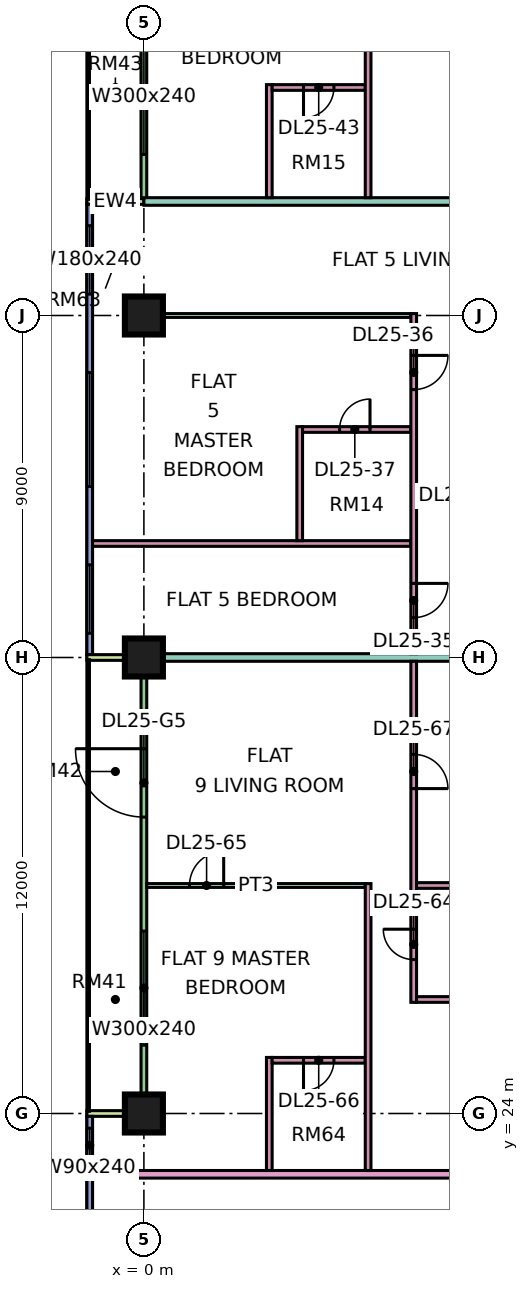
"""IFC4 building model, lengths in metres.
Left out: names, types, materials, properties, quantities, classifications, styles, units other than length and angle.
Written with IfcOpenShell. Run it as: python <this file> out.ifc"""

import sys

from ifc_helpers import new_model, si_unit, direction, frame, frame_2d, origin, origin_2d, place, context, subcontext, project, spatial, rectangle, extrude, element, fill, save


model = new_model("IFC4")
c1 = context("Model", 3, precision=1e-05, world=origin(), true_north=direction((0.0, 1.0)))
c2 = subcontext(c1, "Body", "Model", "MODEL_VIEW")
j1 = project(units=[si_unit("LENGTHUNIT", "METRE"), si_unit("PLANEANGLEUNIT", "RADIAN")], contexts=[c1])
p1 = place(None, origin())
s1 = spatial("IfcSite", under=j1, at=p1, CompositionType="ELEMENT")
p2 = place(p1, origin())
s2 = spatial("IfcBuilding", under=s1, at=p2, CompositionType="ELEMENT")
p3 = place(p2, frame((0.0, 0.0, 110.65)))
s3 = spatial("IfcBuildingStorey", under=s2, at=p3, CompositionType="ELEMENT", Elevation=110.65)
p4 = place(p3, frame((0.0, 24.0, 0.0), z_axis=(0.0, 0.0, 1.0), x_axis=(1.0, 0.0, 0.0)))
e1 = element("IfcColumn", 1, at=p4, inside=s3, PredefinedType="COLUMN", context=c2, shape_type="SweptSolid", body=[
    extrude(rectangle(XDim=1.0, YDim=1.0, at=origin_2d()), origin(), (0.0, 0.0, 1.0), 3.75),
])
p5 = place(p3, frame((0.0, 36.0, 0.0), z_axis=(0.0, 0.0, 1.0), x_axis=(1.0, 0.0, 0.0)))
e2 = element("IfcColumn", 2, at=p5, inside=s3, PredefinedType="COLUMN", context=c2, shape_type="SweptSolid", body=[
    extrude(rectangle(XDim=1.0, YDim=1.0, at=origin_2d()), origin(), (0.0, 0.0, 1.0), 3.75),
])
p6 = place(p3, frame((0.0, 45.0, 0.0), z_axis=(0.0, 0.0, 1.0), x_axis=(1.0, 0.0, 0.0)))
e3 = element("IfcColumn", 3, at=p6, inside=s3, PredefinedType="COLUMN", context=c2, shape_type="SweptSolid", body=[
    extrude(rectangle(XDim=1.0, YDim=1.0, at=origin_2d()), origin(), (0.0, 0.0, 1.0), 3.75),
])
p7 = place(p3, frame((0.0, 61.425, 0.0), z_axis=(0.0, 0.0, 1.0), x_axis=(0.0, -1.0, 0.0)))
e4 = element("IfcWall", 4, at=p7, inside=s3, PredefinedType="SOLIDWALL", context=c2, shape_type="SweptSolid", body=[
    extrude(rectangle(XDim=13.35, YDim=0.15, at=frame_2d((6.675, 0.0))), origin(), (0.0, 0.0, 1.0), 3.35),
])
p8 = place(p7, frame((0.262, 0.0, 0.45)))
e5 = element("IfcOpeningElement", 5, at=p8, cuts=e4, PredefinedType="OPENING", context=c2, shape_type="SweptSolid", body=[
    extrude(rectangle(XDim=0.9, YDim=2.4, at=frame_2d((0.45, 1.2))), frame((0.0, 0.085, 0.0), z_axis=(0.0, -1.0, 0.0), x_axis=(1.0, 0.0, 0.0)), (0.0, 0.0, 1.0), 0.17),
])
p9 = place(p7, frame((3.225, 0.0, 0.0)))
e6 = element("IfcOpeningElement", 6, at=p9, cuts=e4, PredefinedType="OPENING", context=c2, shape_type="SweptSolid", body=[
    extrude(rectangle(XDim=1.8, YDim=2.4, at=frame_2d((0.9, 1.2))), frame((0.0, 0.085, 0.0), z_axis=(0.0, -1.0, 0.0), x_axis=(1.0, 0.0, 0.0)), (0.0, 0.0, 1.0), 0.17),
])
p10 = place(p7, frame((9.188, 0.0, 0.45)))
e7 = element("IfcOpeningElement", 7, at=p10, cuts=e4, PredefinedType="OPENING", context=c2, shape_type="SweptSolid", body=[
    extrude(rectangle(XDim=3.0, YDim=2.4, at=frame_2d((1.5, 1.2))), frame((0.0, 0.085, 0.0), z_axis=(0.0, -1.0, 0.0), x_axis=(1.0, 0.0, 0.0)), (0.0, 0.0, 1.0), 0.17),
])
p11 = place(p3, frame((-1.5, 48.0, 0.0), z_axis=(0.0, 0.0, 1.0), x_axis=(1.0, 0.0, 0.0)))
e8 = element("IfcWall", 8, at=p11, inside=s3, PredefinedType="SOLIDWALL", context=c2, shape_type="SweptSolid", body=[
    extrude(rectangle(XDim=1.5, YDim=0.15, at=frame_2d((0.75, 0.0))), origin(), (0.0, 0.0, 1.0), 3.35),
])
p12 = place(p3, frame((-1.425, 47.925, 0.0), z_axis=(0.0, 0.0, 1.0), x_axis=(0.0, -1.0, 0.0)))
e9 = element("IfcWall", 9, at=p12, inside=s3, PredefinedType="SOLIDWALL", context=c2, shape_type="SweptSolid", body=[
    extrude(rectangle(XDim=11.85, YDim=0.15, at=frame_2d((5.925, 0.0))), origin(), (0.0, 0.0, 1.0), 3.35),
])
p13 = place(p12, frame((0.562, 0.0, 0.45)))
e10 = element("IfcOpeningElement", 10, at=p13, cuts=e9, PredefinedType="OPENING", context=c2, shape_type="SweptSolid", body=[
    extrude(rectangle(XDim=1.8, YDim=2.4, at=frame_2d((0.9, 1.2))), frame((0.0, 0.085, 0.0), z_axis=(0.0, -1.0, 0.0), x_axis=(1.0, 0.0, 0.0)), (0.0, 0.0, 1.0), 0.17),
])
p14 = place(p12, frame((4.425, 0.0, 0.45)))
e11 = element("IfcOpeningElement", 11, at=p14, cuts=e9, PredefinedType="OPENING", context=c2, shape_type="SweptSolid", body=[
    extrude(rectangle(XDim=3.0, YDim=2.4, at=frame_2d((1.5, 1.2))), frame((0.0, 0.085, 0.0), z_axis=(0.0, -1.0, 0.0), x_axis=(1.0, 0.0, 0.0)), (0.0, 0.0, 1.0), 0.17),
])
p15 = place(p12, frame((9.488, 0.0, 0.45)))
e12 = element("IfcOpeningElement", 12, at=p15, cuts=e9, PredefinedType="OPENING", context=c2, shape_type="SweptSolid", body=[
    extrude(rectangle(XDim=1.8, YDim=2.4, at=frame_2d((0.9, 1.2))), frame((0.0, 0.085, 0.0), z_axis=(0.0, -1.0, 0.0), x_axis=(1.0, 0.0, 0.0)), (0.0, 0.0, 1.0), 0.17),
])
p16 = place(p3, frame((0.0, 35.925, 0.0), z_axis=(0.0, 0.0, 1.0), x_axis=(0.0, -1.0, 0.0)))
e13 = element("IfcWall", 13, at=p16, inside=s3, PredefinedType="SOLIDWALL", context=c2, shape_type="SweptSolid", body=[
    extrude(rectangle(XDim=11.85, YDim=0.15, at=frame_2d((5.925, 0.0))), origin(), (0.0, 0.0, 1.0), 3.35),
])
p17 = place(p16, frame((2.325, 0.0, 0.0)))
e14 = element("IfcOpeningElement", 14, at=p17, cuts=e13, PredefinedType="OPENING", context=c2, shape_type="SweptSolid", body=[
    extrude(rectangle(XDim=1.8, YDim=2.4, at=frame_2d((0.9, 1.2))), frame((0.0, 0.085, 0.0), z_axis=(0.0, -1.0, 0.0), x_axis=(1.0, 0.0, 0.0)), (0.0, 0.0, 1.0), 0.17),
])
p18 = place(p16, frame((7.125, 0.0, 0.45)))
e15 = element("IfcOpeningElement", 15, at=p18, cuts=e13, PredefinedType="OPENING", context=c2, shape_type="SweptSolid", body=[
    extrude(rectangle(XDim=3.0, YDim=2.4, at=frame_2d((1.5, 1.2))), frame((0.0, 0.085, 0.0), z_axis=(0.0, -1.0, 0.0), x_axis=(1.0, 0.0, 0.0)), (0.0, 0.0, 1.0), 0.17),
])
for number, where, z_axis, x_axis in (
    (16, (-1.5, 36.0, 0.0), (0.0, 0.0, 1.0), (1.0, 0.0, 0.0)),
    (17, (-1.5, 24.0, 0.0), (0.0, 0.0, 1.0), (1.0, 0.0, 0.0)),
):
    element("IfcWall", number, at=place(p3, frame(where, z_axis=z_axis, x_axis=x_axis)), inside=s3, PredefinedType="SOLIDWALL", context=c2, shape_type="SweptSolid", body=[
        extrude(rectangle(XDim=1.5, YDim=0.15, at=frame_2d((0.75, 0.0))), origin(), (0.0, 0.0, 1.0), 3.35),
    ])
p19 = place(p3, frame((-1.425, 23.925, 0.0), z_axis=(0.0, 0.0, 1.0), x_axis=(0.0, -1.0, 0.0)))
e18 = element("IfcWall", 18, at=p19, inside=s3, PredefinedType="SOLIDWALL", context=c2, shape_type="SweptSolid", body=[
    extrude(rectangle(XDim=11.425, YDim=0.15, at=frame_2d((5.712, 0.0))), origin(), (0.0, 0.0, 1.0), 3.35),
])
p20 = place(p19, frame((0.312, 0.0, 0.45)))
e19 = element("IfcOpeningElement", 19, at=p20, cuts=e18, PredefinedType="OPENING", context=c2, shape_type="SweptSolid", body=[
    extrude(rectangle(XDim=0.9, YDim=2.4, at=frame_2d((0.45, 1.2))), frame((0.0, 0.085, 0.0), z_axis=(0.0, -1.0, 0.0), x_axis=(1.0, 0.0, 0.0)), (0.0, 0.0, 1.0), 0.17),
])
p21 = place(p19, frame((6.175, 0.0, 0.45)))
e20 = element("IfcOpeningElement", 20, at=p21, cuts=e18, PredefinedType="OPENING", context=c2, shape_type="SweptSolid", body=[
    extrude(rectangle(XDim=3.0, YDim=2.4, at=frame_2d((1.5, 1.2))), frame((0.0, 0.085, 0.0), z_axis=(0.0, -1.0, 0.0), x_axis=(1.0, 0.0, 0.0)), (0.0, 0.0, 1.0), 0.17),
])
p22 = place(p3, frame((-1.351, 39.0, 0.0), z_axis=(0.0, 0.0, 1.0), x_axis=(1.0, 0.0, 0.0)))
e21 = element("IfcWall", 21, at=p22, inside=s3, PredefinedType="PARTITIONING", context=c2, shape_type="SweptSolid", body=[
    extrude(rectangle(XDim=8.376, YDim=0.15, at=frame_2d((4.188, 0.0))), origin(), (0.0, 0.0, 1.0), 3.35),
])
p23 = place(p3, frame((-1.35, 22.4, 0.0), z_axis=(0.0, 0.0, 1.0), x_axis=(1.0, 0.0, 0.0)))
e22 = element("IfcWall", 22, at=p23, inside=s3, PredefinedType="PARTITIONING", context=c2, shape_type="SweptSolid", body=[
    extrude(rectangle(XDim=13.75, YDim=0.2, at=frame_2d((6.875, 0.0))), origin(), (0.0, 0.0, 1.0), 3.35),
])
e23 = element("IfcWall", 23, at=p5, inside=s3, PredefinedType="PARTITIONING", context=c2, shape_type="SweptSolid", body=[
    extrude(rectangle(XDim=12.4, YDim=0.2, at=frame_2d((6.2, 0.0))), origin(), (0.0, 0.0, 1.0), 3.35),
])
e24 = element("IfcWall", 24, at=p6, inside=s3, PredefinedType="PARTITIONING", context=c2, shape_type="SweptSolid", body=[
    extrude(rectangle(XDim=7.025, YDim=0.1, at=frame_2d((3.512, 0.0))), origin(), (0.0, 0.0, 1.0), 3.35),
])
p24 = place(p3, frame((0.0, 48.0, 0.0), z_axis=(0.0, 0.0, 1.0), x_axis=(1.0, 0.0, 0.0)))
e25 = element("IfcWall", 25, at=p24, inside=s3, PredefinedType="PARTITIONING", context=c2, shape_type="SweptSolid", body=[
    extrude(rectangle(XDim=12.4, YDim=0.2, at=frame_2d((6.2, 0.0))), origin(), (0.0, 0.0, 1.0), 3.35),
])
p25 = place(p3, frame((0.074, 30.0, 0.0), z_axis=(0.0, 0.0, 1.0), x_axis=(1.0, 0.0, 0.0)))
e26 = element("IfcWall", 26, at=p25, inside=s3, PredefinedType="PARTITIONING", context=c2, shape_type="SweptSolid", body=[
    extrude(rectangle(XDim=5.751, YDim=0.1, at=frame_2d((2.875, 0.0))), origin(), (0.0, 0.0, 1.0), 3.35),
])
p26 = place(p25, frame((1.126, 0.0, 0.0)))
e27 = element("IfcOpeningElement", 27, at=p26, cuts=e26, PredefinedType="OPENING", context=c2, shape_type="SweptSolid", body=[
    extrude(rectangle(XDim=0.9, YDim=2.1, at=frame_2d((0.45, 1.05))), frame((0.0, 0.06, 0.0), z_axis=(0.0, -1.0, 0.0), x_axis=(1.0, 0.0, 0.0)), (0.0, 0.0, 1.0), 0.12),
])
p27 = place(p3, frame((3.3, 22.5, 0.0), z_axis=(0.0, 0.0, 1.0), x_axis=(0.0, 1.0, 0.0)))
e28 = element("IfcWall", 28, at=p27, inside=s3, PredefinedType="PARTITIONING", context=c2, shape_type="SweptSolid", body=[
    extrude(rectangle(XDim=2.975, YDim=0.15, at=frame_2d((1.488, 0.0))), origin(), (0.0, 0.0, 1.0), 3.35),
])
p28 = place(p3, frame((3.3, 48.1, 0.0), z_axis=(0.0, 0.0, 1.0), x_axis=(0.0, 1.0, 0.0)))
e29 = element("IfcWall", 29, at=p28, inside=s3, PredefinedType="PARTITIONING", context=c2, shape_type="SweptSolid", body=[
    extrude(rectangle(XDim=2.975, YDim=0.15, at=frame_2d((1.487, 0.0))), origin(), (0.0, 0.0, 1.0), 3.35),
])
p29 = place(p3, frame((3.375, 25.4, 0.0), z_axis=(0.0, 0.0, 1.0), x_axis=(1.0, 0.0, 0.0)))
e30 = element("IfcWall", 30, at=p29, inside=s3, PredefinedType="PARTITIONING", context=c2, shape_type="SweptSolid", body=[
    extrude(rectangle(XDim=2.45, YDim=0.15, at=frame_2d((1.225, 0.0))), origin(), (0.0, 0.0, 1.0), 3.35),
])
p30 = place(p29, frame((0.825, 0.0, 0.0)))
e31 = element("IfcOpeningElement", 31, at=p30, cuts=e30, PredefinedType="OPENING", context=c2, shape_type="SweptSolid", body=[
    extrude(rectangle(XDim=0.8, YDim=2.1, at=frame_2d((0.4, 1.05))), frame((0.0, 0.085, 0.0), z_axis=(0.0, -1.0, 0.0), x_axis=(1.0, 0.0, 0.0)), (0.0, 0.0, 1.0), 0.17),
])
p31 = place(p3, frame((3.375, 51.0, 0.0), z_axis=(0.0, 0.0, 1.0), x_axis=(1.0, 0.0, 0.0)))
e32 = element("IfcWall", 32, at=p31, inside=s3, PredefinedType="PARTITIONING", context=c2, shape_type="SweptSolid", body=[
    extrude(rectangle(XDim=2.45, YDim=0.15, at=frame_2d((1.225, 0.0))), origin(), (0.0, 0.0, 1.0), 3.35),
])
p32 = place(p31, frame((0.825, 0.0, 0.0)))
e33 = element("IfcOpeningElement", 33, at=p32, cuts=e32, PredefinedType="OPENING", context=c2, shape_type="SweptSolid", body=[
    extrude(rectangle(XDim=0.8, YDim=2.1, at=frame_2d((0.4, 1.05))), frame((0.0, 0.085, 0.0), z_axis=(0.0, -1.0, 0.0), x_axis=(1.0, 0.0, 0.0)), (0.0, 0.0, 1.0), 0.17),
])
p33 = place(p3, frame((4.1, 39.075, 0.0), z_axis=(0.0, 0.0, 1.0), x_axis=(0.0, 1.0, 0.0)))
e34 = element("IfcWall", 34, at=p33, inside=s3, PredefinedType="PARTITIONING", context=c2, shape_type="SweptSolid", body=[
    extrude(rectangle(XDim=3.0, YDim=0.15, at=frame_2d((1.5, 0.0))), origin(), (0.0, 0.0, 1.0), 3.35),
])
p34 = place(p3, frame((4.175, 42.0, 0.0), z_axis=(0.0, 0.0, 1.0), x_axis=(1.0, 0.0, 0.0)))
e35 = element("IfcWall", 35, at=p34, inside=s3, PredefinedType="PARTITIONING", context=c2, shape_type="SweptSolid", body=[
    extrude(rectangle(XDim=2.85, YDim=0.15, at=frame_2d((1.425, 0.0))), origin(), (0.0, 0.0, 1.0), 3.35),
])
p35 = place(p34, frame((0.975, 0.0, 0.0)))
e36 = element("IfcOpeningElement", 36, at=p35, cuts=e35, PredefinedType="OPENING", context=c2, shape_type="SweptSolid", body=[
    extrude(rectangle(XDim=0.8, YDim=2.1, at=frame_2d((0.4, 1.05))), frame((0.0, 0.085, 0.0), z_axis=(0.0, -1.0, 0.0), x_axis=(1.0, 0.0, 0.0)), (0.0, 0.0, 1.0), 0.17),
])
p36 = place(p3, frame((5.9, 22.5, 0.0), z_axis=(0.0, 0.0, 1.0), x_axis=(0.0, 1.0, 0.0)))
e37 = element("IfcWall", 37, at=p36, inside=s3, PredefinedType="PARTITIONING", context=c2, shape_type="SweptSolid", body=[
    extrude(rectangle(XDim=7.55, YDim=0.15, at=frame_2d((3.775, 0.0))), origin(), (0.0, 0.0, 1.0), 3.35),
])
p37 = place(p3, frame((5.9, 48.1, 0.0), z_axis=(0.0, 0.0, 1.0), x_axis=(0.0, 1.0, 0.0)))
e38 = element("IfcWall", 38, at=p37, inside=s3, PredefinedType="PARTITIONING", context=c2, shape_type="SweptSolid", body=[
    extrude(rectangle(XDim=5.95, YDim=0.15, at=frame_2d((2.975, 0.0))), origin(), (0.0, 0.0, 1.0), 3.35),
])
p38 = place(p37, frame((3.95, 0.0, 0.0)))
e39 = element("IfcOpeningElement", 39, at=p38, cuts=e38, PredefinedType="OPENING", context=c2, shape_type="SweptSolid", body=[
    extrude(rectangle(XDim=0.9, YDim=2.1, at=frame_2d((0.45, 1.05))), frame((0.0, 0.085, 0.0), z_axis=(0.0, -1.0, 0.0), x_axis=(1.0, 0.0, 0.0)), (0.0, 0.0, 1.0), 0.17),
])
p39 = place(p3, frame((7.1, 26.925, 0.0), z_axis=(0.0, 0.0, 1.0), x_axis=(0.0, 1.0, 0.0)))
e40 = element("IfcWall", 40, at=p39, inside=s3, PredefinedType="PARTITIONING", context=c2, shape_type="SweptSolid", body=[
    extrude(rectangle(XDim=8.975, YDim=0.15, at=frame_2d((4.487, 0.0))), origin(), (0.0, 0.0, 1.0), 3.35),
])
p40 = place(p39, frame((1.125, 0.0, 0.0)))
e41 = element("IfcOpeningElement", 41, at=p40, cuts=e40, PredefinedType="OPENING", context=c2, shape_type="SweptSolid", body=[
    extrude(rectangle(XDim=0.8, YDim=2.1, at=frame_2d((0.4, 1.05))), frame((0.0, 0.085, 0.0), z_axis=(0.0, -1.0, 0.0), x_axis=(1.0, 0.0, 0.0)), (0.0, 0.0, 1.0), 0.17),
])
p41 = place(p39, frame((5.625, 0.0, 0.0)))
e42 = element("IfcOpeningElement", 42, at=p41, cuts=e40, PredefinedType="OPENING", context=c2, shape_type="SweptSolid", body=[
    extrude(rectangle(XDim=0.9, YDim=2.1, at=frame_2d((0.45, 1.05))), frame((0.0, 0.085, 0.0), z_axis=(0.0, -1.0, 0.0), x_axis=(1.0, 0.0, 0.0)), (0.0, 0.0, 1.0), 0.17),
])
p42 = place(p3, frame((7.1, 36.1, 0.0), z_axis=(0.0, 0.0, 1.0), x_axis=(0.0, 1.0, 0.0)))
e43 = element("IfcWall", 43, at=p42, inside=s3, PredefinedType="PARTITIONING", context=c2, shape_type="SweptSolid", body=[
    extrude(rectangle(XDim=8.95, YDim=0.15, at=frame_2d((4.475, 0.0))), origin(), (0.0, 0.0, 1.0), 3.35),
])
p43 = place(p42, frame((0.95, 0.0, 0.0)))
e44 = element("IfcOpeningElement", 44, at=p43, cuts=e43, PredefinedType="OPENING", context=c2, shape_type="SweptSolid", body=[
    extrude(rectangle(XDim=0.9, YDim=2.1, at=frame_2d((0.45, 1.05))), frame((0.0, 0.085, 0.0), z_axis=(0.0, -1.0, 0.0), x_axis=(1.0, 0.0, 0.0)), (0.0, 0.0, 1.0), 0.17),
])
p44 = place(p42, frame((6.95, 0.0, 0.0)))
e45 = element("IfcOpeningElement", 45, at=p44, cuts=e43, PredefinedType="OPENING", context=c2, shape_type="SweptSolid", body=[
    extrude(rectangle(XDim=0.9, YDim=2.1, at=frame_2d((0.45, 1.05))), frame((0.0, 0.085, 0.0), z_axis=(0.0, -1.0, 0.0), x_axis=(1.0, 0.0, 0.0)), (0.0, 0.0, 1.0), 0.17),
])
for number, where, z_axis, x_axis in (
    (46, (7.175, 27.0, 0.0), (0.0, 0.0, 1.0), (1.0, 0.0, 0.0)),
    (47, (7.175, 30.0, 0.0), (0.0, 0.0, 1.0), (1.0, 0.0, 0.0)),
):
    element("IfcWall", number, at=place(p3, frame(where, z_axis=z_axis, x_axis=x_axis)), inside=s3, PredefinedType="PARTITIONING", context=c2, shape_type="SweptSolid", body=[
        extrude(rectangle(XDim=5.225, YDim=0.15, at=frame_2d((2.612, 0.0))), origin(), (0.0, 0.0, 1.0), 3.35),
    ])
p45 = place(p10, origin())
e48 = element("IfcWindow", 48, at=p45, inside=s3, PartitioningType="SINGLE_PANEL", PredefinedType="WINDOW", context=c2, shape_type="SweptSolid", body=[
    extrude(rectangle(XDim=3.0, YDim=2.4, at=frame_2d((1.5, 1.2))), frame((0.0, 0.03, 0.0), z_axis=(0.0, -1.0, 0.0), x_axis=(1.0, 0.0, 0.0)), (0.0, 0.0, 1.0), 0.06),
])
fill(e7, e48)
p46 = place(p13, origin())
e49 = element("IfcWindow", 49, at=p46, inside=s3, PartitioningType="SINGLE_PANEL", PredefinedType="WINDOW", context=c2, shape_type="SweptSolid", body=[
    extrude(rectangle(XDim=1.8, YDim=2.4, at=frame_2d((0.9, 1.2))), frame((0.0, 0.03, 0.0), z_axis=(0.0, -1.0, 0.0), x_axis=(1.0, 0.0, 0.0)), (0.0, 0.0, 1.0), 0.06),
])
fill(e10, e49)
p47 = place(p14, origin())
e50 = element("IfcWindow", 50, at=p47, inside=s3, PartitioningType="SINGLE_PANEL", PredefinedType="WINDOW", context=c2, shape_type="SweptSolid", body=[
    extrude(rectangle(XDim=3.0, YDim=2.4, at=frame_2d((1.5, 1.2))), frame((0.0, 0.03, 0.0), z_axis=(0.0, -1.0, 0.0), x_axis=(1.0, 0.0, 0.0)), (0.0, 0.0, 1.0), 0.06),
])
fill(e11, e50)
p48 = place(p15, origin())
e51 = element("IfcWindow", 51, at=p48, inside=s3, PartitioningType="SINGLE_PANEL", PredefinedType="WINDOW", context=c2, shape_type="SweptSolid", body=[
    extrude(rectangle(XDim=1.8, YDim=2.4, at=frame_2d((0.9, 1.2))), frame((0.0, 0.03, 0.0), z_axis=(0.0, -1.0, 0.0), x_axis=(1.0, 0.0, 0.0)), (0.0, 0.0, 1.0), 0.06),
])
fill(e12, e51)
p49 = place(p17, frame((1.8, 0.0, 0.0), z_axis=(0.0, 0.0, 1.0), x_axis=(-1.0, 0.0, 0.0)))
e52 = element("IfcDoor", 52, at=p49, inside=s3, OperationType="DOUBLE_DOOR_SINGLE_SWING", PredefinedType="DOOR", context=c2, shape_type="SweptSolid", body=[
    extrude(rectangle(XDim=1.8, YDim=2.4, at=frame_2d((0.9, 1.2))), frame((0.0, 0.025, 0.0), z_axis=(0.0, -1.0, 0.0), x_axis=(1.0, 0.0, 0.0)), (0.0, 0.0, 1.0), 0.05),
])
fill(e14, e52)
p50 = place(p18, origin())
e53 = element("IfcWindow", 53, at=p50, inside=s3, PartitioningType="SINGLE_PANEL", PredefinedType="WINDOW", context=c2, shape_type="SweptSolid", body=[
    extrude(rectangle(XDim=3.0, YDim=2.4, at=frame_2d((1.5, 1.2))), frame((0.0, 0.03, 0.0), z_axis=(0.0, -1.0, 0.0), x_axis=(1.0, 0.0, 0.0)), (0.0, 0.0, 1.0), 0.06),
])
fill(e15, e53)
p51 = place(p20, origin())
e54 = element("IfcWindow", 54, at=p51, inside=s3, PartitioningType="SINGLE_PANEL", PredefinedType="WINDOW", context=c2, shape_type="SweptSolid", body=[
    extrude(rectangle(XDim=0.9, YDim=2.4, at=frame_2d((0.45, 1.2))), frame((0.0, 0.03, 0.0), z_axis=(0.0, -1.0, 0.0), x_axis=(1.0, 0.0, 0.0)), (0.0, 0.0, 1.0), 0.06),
])
fill(e19, e54)
p52 = place(p43, origin())
e55 = element("IfcDoor", 55, at=p52, inside=s3, OperationType="SINGLE_SWING_RIGHT", PredefinedType="DOOR", context=c2, shape_type="SweptSolid", body=[
    extrude(rectangle(XDim=0.9, YDim=2.1, at=frame_2d((0.45, 1.05))), frame((0.0, 0.025, 0.0), z_axis=(0.0, -1.0, 0.0), x_axis=(1.0, 0.0, 0.0)), (0.0, 0.0, 1.0), 0.05),
])
fill(e44, e55)
p53 = place(p44, origin())
e56 = element("IfcDoor", 56, at=p53, inside=s3, OperationType="SINGLE_SWING_RIGHT", PredefinedType="DOOR", context=c2, shape_type="SweptSolid", body=[
    extrude(rectangle(XDim=0.9, YDim=2.1, at=frame_2d((0.45, 1.05))), frame((0.0, 0.025, 0.0), z_axis=(0.0, -1.0, 0.0), x_axis=(1.0, 0.0, 0.0)), (0.0, 0.0, 1.0), 0.05),
])
fill(e45, e56)
p54 = place(p35, frame((0.8, 0.0, 0.0), z_axis=(0.0, 0.0, 1.0), x_axis=(-1.0, 0.0, 0.0)))
e57 = element("IfcDoor", 57, at=p54, inside=s3, OperationType="SINGLE_SWING_RIGHT", PredefinedType="DOOR", context=c2, shape_type="SweptSolid", body=[
    extrude(rectangle(XDim=0.8, YDim=2.1, at=frame_2d((0.4, 1.05))), frame((0.0, 0.025, 0.0), z_axis=(0.0, -1.0, 0.0), x_axis=(1.0, 0.0, 0.0)), (0.0, 0.0, 1.0), 0.05),
])
fill(e36, e57)
p55 = place(p32, frame((0.8, 0.0, 0.0), z_axis=(0.0, 0.0, 1.0), x_axis=(-1.0, 0.0, 0.0)))
e58 = element("IfcDoor", 58, at=p55, inside=s3, OperationType="SINGLE_SWING_LEFT", PredefinedType="DOOR", context=c2, shape_type="SweptSolid", body=[
    extrude(rectangle(XDim=0.8, YDim=2.1, at=frame_2d((0.4, 1.05))), frame((0.0, 0.025, 0.0), z_axis=(0.0, -1.0, 0.0), x_axis=(1.0, 0.0, 0.0)), (0.0, 0.0, 1.0), 0.05),
])
fill(e33, e58)
p56 = place(p40, frame((0.8, 0.0, 0.0), z_axis=(0.0, 0.0, 1.0), x_axis=(-1.0, 0.0, 0.0)))
e59 = element("IfcDoor", 59, at=p56, inside=s3, OperationType="SINGLE_SWING_RIGHT", PredefinedType="DOOR", context=c2, shape_type="SweptSolid", body=[
    extrude(rectangle(XDim=0.8, YDim=2.1, at=frame_2d((0.4, 1.05))), frame((0.0, 0.025, 0.0), z_axis=(0.0, -1.0, 0.0), x_axis=(1.0, 0.0, 0.0)), (0.0, 0.0, 1.0), 0.05),
])
fill(e41, e59)
p57 = place(p26, frame((0.9, 0.0, 0.0), z_axis=(0.0, 0.0, 1.0), x_axis=(-1.0, 0.0, 0.0)))
e60 = element("IfcDoor", 60, at=p57, inside=s3, OperationType="SINGLE_SWING_RIGHT", PredefinedType="DOOR", context=c2, shape_type="SweptSolid", body=[
    extrude(rectangle(XDim=0.9, YDim=2.1, at=frame_2d((0.45, 1.05))), frame((0.0, 0.025, 0.0), z_axis=(0.0, -1.0, 0.0), x_axis=(1.0, 0.0, 0.0)), (0.0, 0.0, 1.0), 0.05),
])
fill(e27, e60)
p58 = place(p30, frame((0.8, 0.0, 0.0), z_axis=(0.0, 0.0, 1.0), x_axis=(-1.0, 0.0, 0.0)))
e61 = element("IfcDoor", 61, at=p58, inside=s3, OperationType="SINGLE_SWING_LEFT", PredefinedType="DOOR", context=c2, shape_type="SweptSolid", body=[
    extrude(rectangle(XDim=0.8, YDim=2.1, at=frame_2d((0.4, 1.05))), frame((0.0, 0.025, 0.0), z_axis=(0.0, -1.0, 0.0), x_axis=(1.0, 0.0, 0.0)), (0.0, 0.0, 1.0), 0.05),
])
fill(e31, e61)
p59 = place(p41, frame((0.9, 0.0, 0.0), z_axis=(0.0, 0.0, 1.0), x_axis=(-1.0, 0.0, 0.0)))
e62 = element("IfcDoor", 62, at=p59, inside=s3, OperationType="SINGLE_SWING_LEFT", PredefinedType="DOOR", context=c2, shape_type="SweptSolid", body=[
    extrude(rectangle(XDim=0.9, YDim=2.1, at=frame_2d((0.45, 1.05))), frame((0.0, 0.025, 0.0), z_axis=(0.0, -1.0, 0.0), x_axis=(1.0, 0.0, 0.0)), (0.0, 0.0, 1.0), 0.05),
])
fill(e42, e62)
save(model, sys.argv[1])
